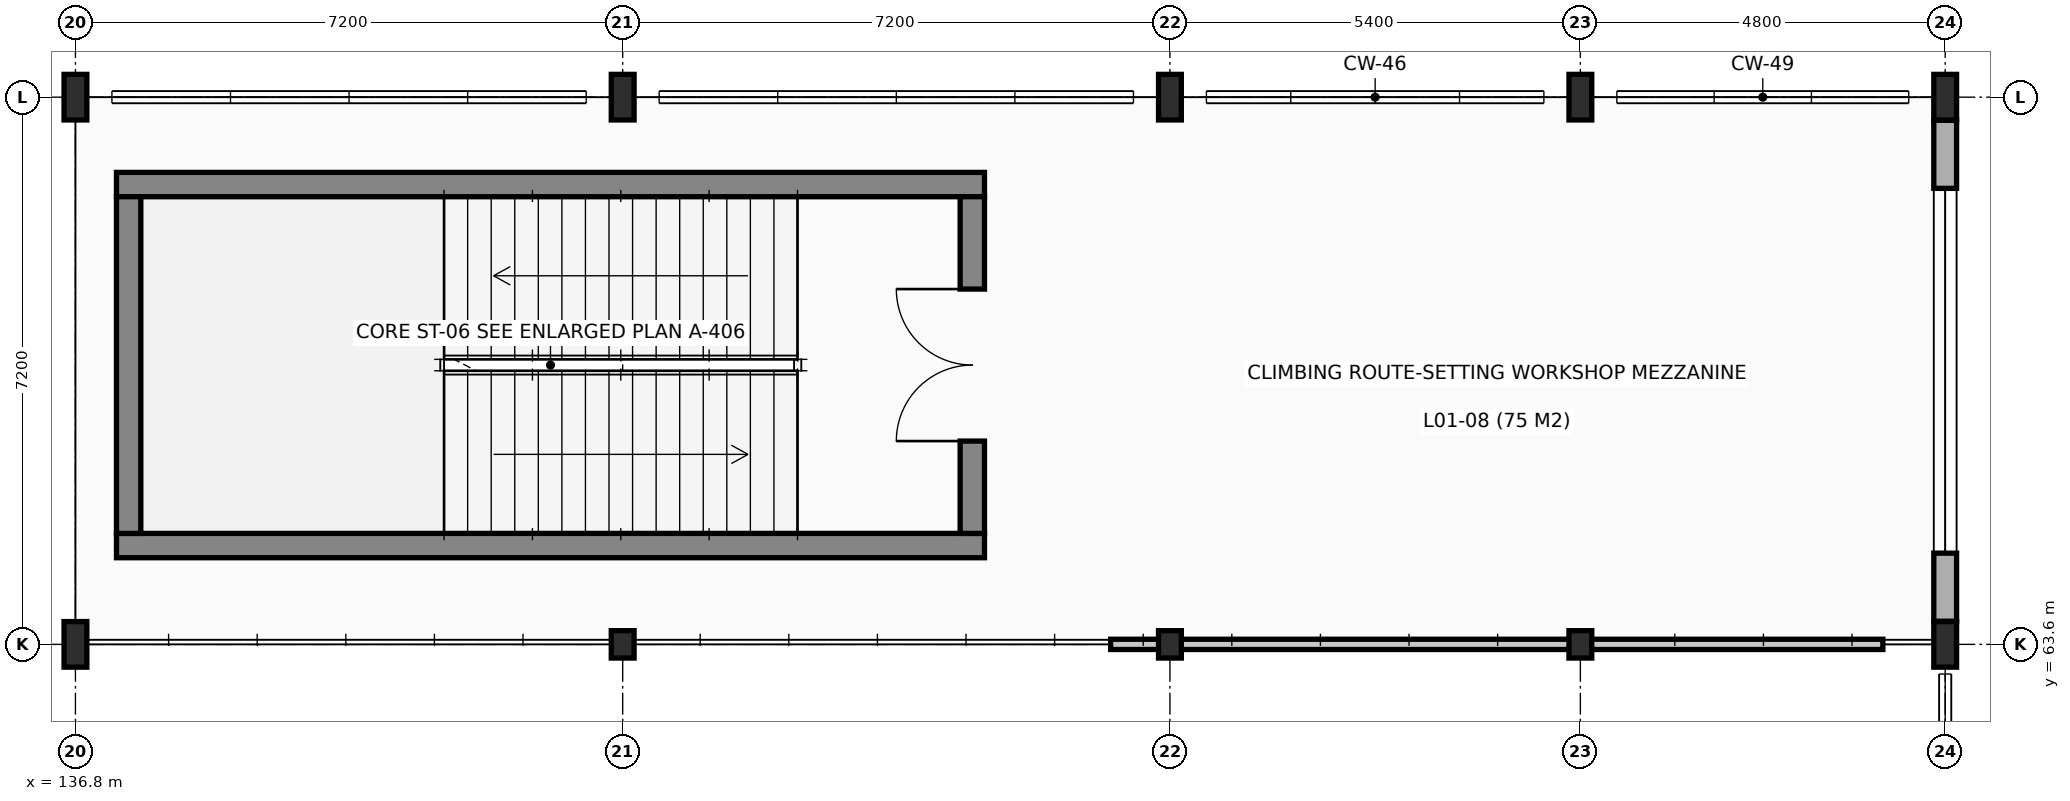
"""IFC4 building model, lengths in metres.
Left out: names, types, materials, properties, quantities, classifications, styles, units other than length and angle.
Written with IfcOpenShell. Run it as: python <this file> out.ifc"""

import sys

from ifc_helpers import new_model, si_unit, direction, frame, frame_2d, origin, origin_2d, place, context, subcontext, project, spatial, rectangle, i_section, extrude, element, fill, save


model = new_model("IFC4")
c1 = context("Model", 3, precision=1e-05, world=origin(), true_north=direction((0.0, 1.0)))
c2 = subcontext(c1, "Body", "Model", "MODEL_VIEW")
j1 = project(units=[si_unit("LENGTHUNIT", "METRE"), si_unit("PLANEANGLEUNIT", "RADIAN")], contexts=[c1])
p1 = place(None, origin())
s1 = spatial("IfcSite", under=j1, at=p1, CompositionType="ELEMENT")
p2 = place(p1, origin())
s2 = spatial("IfcBuilding", under=s1, at=p2, CompositionType="ELEMENT")
p3 = place(p2, frame((0.0, 0.0, 4.8)))
s3 = spatial("IfcBuildingStorey", under=s2, at=p3, CompositionType="ELEMENT", Elevation=4.8)
for number, where, z_axis, x_axis in (
    (1, (136.8, 63.6, 0.0), (0.0, 0.0, 1.0), (1.0, 0.0, 0.0)),
    (2, (136.8, 70.8, 0.0), (0.0, 0.0, 1.0), (1.0, 0.0, 0.0)),
):
    element("IfcColumn", number, at=place(p3, frame(where, z_axis=z_axis, x_axis=x_axis)), inside=s3, PredefinedType="COLUMN", context=c2, shape_type="SweptSolid", body=[
        extrude(i_section(OverallWidth=0.3, OverallDepth=0.6, WebThickness=0.015, FlangeThickness=0.03, at=origin_2d()), origin(), (0.0, 0.0, 1.0), 4.8),
    ])
p4 = place(p3, frame((144.0, 63.6, 0.0), z_axis=(0.0, 0.0, 1.0), x_axis=(1.0, 0.0, 0.0)))
e3 = element("IfcColumn", 3, at=p4, inside=s3, PredefinedType="COLUMN", context=c2, shape_type="SweptSolid", body=[
    extrude(i_section(OverallWidth=0.3, OverallDepth=0.36, WebThickness=0.012, FlangeThickness=0.022, at=origin_2d()), origin(), (0.0, 0.0, 1.0), 4.8),
])
p5 = place(p3, frame((144.0, 70.8, 0.0), z_axis=(0.0, 0.0, 1.0), x_axis=(1.0, 0.0, 0.0)))
e4 = element("IfcColumn", 4, at=p5, inside=s3, PredefinedType="COLUMN", context=c2, shape_type="SweptSolid", body=[
    extrude(i_section(OverallWidth=0.3, OverallDepth=0.6, WebThickness=0.015, FlangeThickness=0.03, at=origin_2d()), origin(), (0.0, 0.0, 1.0), 4.8),
])
p6 = place(p3, frame((151.2, 63.6, 0.0), z_axis=(0.0, 0.0, 1.0), x_axis=(1.0, 0.0, 0.0)))
e5 = element("IfcColumn", 5, at=p6, inside=s3, PredefinedType="COLUMN", context=c2, shape_type="SweptSolid", body=[
    extrude(i_section(OverallWidth=0.3, OverallDepth=0.36, WebThickness=0.012, FlangeThickness=0.022, at=origin_2d()), origin(), (0.0, 0.0, 1.0), 4.8),
])
p7 = place(p3, frame((151.2, 70.8, 0.0), z_axis=(0.0, 0.0, 1.0), x_axis=(1.0, 0.0, 0.0)))
e6 = element("IfcColumn", 6, at=p7, inside=s3, PredefinedType="COLUMN", context=c2, shape_type="SweptSolid", body=[
    extrude(i_section(OverallWidth=0.3, OverallDepth=0.6, WebThickness=0.015, FlangeThickness=0.03, at=origin_2d()), origin(), (0.0, 0.0, 1.0), 4.8),
])
p8 = place(p3, frame((156.6, 63.6, 0.0), z_axis=(0.0, 0.0, 1.0), x_axis=(1.0, 0.0, 0.0)))
e7 = element("IfcColumn", 7, at=p8, inside=s3, PredefinedType="COLUMN", context=c2, shape_type="SweptSolid", body=[
    extrude(i_section(OverallWidth=0.3, OverallDepth=0.36, WebThickness=0.012, FlangeThickness=0.022, at=origin_2d()), origin(), (0.0, 0.0, 1.0), 4.8),
])
for number, where, z_axis, x_axis in (
    (8, (156.6, 70.8, 0.0), (0.0, 0.0, 1.0), (1.0, 0.0, 0.0)),
    (9, (161.4, 63.6, 0.0), (0.0, 0.0, 1.0), (1.0, 0.0, 0.0)),
    (10, (161.4, 70.8, 0.0), (0.0, 0.0, 1.0), (1.0, 0.0, 0.0)),
):
    element("IfcColumn", number, at=place(p3, frame(where, z_axis=z_axis, x_axis=x_axis)), inside=s3, PredefinedType="COLUMN", context=c2, shape_type="SweptSolid", body=[
        extrude(i_section(OverallWidth=0.3, OverallDepth=0.6, WebThickness=0.015, FlangeThickness=0.03, at=origin_2d()), origin(), (0.0, 0.0, 1.0), 4.8),
    ])
p9 = place(p3, frame((161.4, 63.904, 0.0), z_axis=(0.0, 0.0, 1.0), x_axis=(0.0, 1.0, 0.0)))
e11 = element("IfcWall", 11, at=p9, inside=s3, PredefinedType="SOLIDWALL", context=c2, shape_type="SweptSolid", body=[
    extrude(rectangle(XDim=6.592, YDim=0.3, at=frame_2d((3.296, 0.0))), origin(), (0.0, 0.0, 1.0), 4.145),
])
p10 = place(p9, frame((0.896, 0.0, 1.0)))
e12 = element("IfcOpeningElement", 12, at=p10, cuts=e11, PredefinedType="OPENING", context=c2, shape_type="SweptSolid", body=[
    extrude(rectangle(XDim=4.8, YDim=1.5, at=frame_2d((2.4, 0.75))), frame((0.0, 0.16, 0.0), z_axis=(0.0, -1.0, 0.0), x_axis=(1.0, 0.0, 0.0)), (0.0, 0.0, 1.0), 0.32),
])
for number, where, z_axis, x_axis in (
    (13, (137.34, 64.9, 0.0), (0.0, 0.0, 1.0), (1.0, 0.0, 0.0)),
    (14, (137.34, 69.65, 0.0), (0.0, 0.0, 1.0), (1.0, 0.0, 0.0)),
):
    element("IfcWall", number, at=place(p3, frame(where, z_axis=z_axis, x_axis=x_axis)), inside=s3, PredefinedType="SHEAR", context=c2, shape_type="SweptSolid", body=[
        extrude(rectangle(XDim=11.42, YDim=0.32, at=frame_2d((5.71, 0.0))), origin(), (0.0, 0.0, 1.0), 4.56),
    ])
p11 = place(p3, frame((137.5, 65.06, 0.0), z_axis=(0.0, 0.0, 1.0), x_axis=(0.0, 1.0, 0.0)))
e15 = element("IfcWall", 15, at=p11, inside=s3, PredefinedType="SHEAR", context=c2, shape_type="SweptSolid", body=[
    extrude(rectangle(XDim=4.43, YDim=0.32, at=frame_2d((2.215, 0.0))), origin(), (0.0, 0.0, 1.0), 4.56),
])
p12 = place(p3, frame((148.6, 65.06, 0.0), z_axis=(0.0, 0.0, 1.0), x_axis=(0.0, 1.0, 0.0)))
e16 = element("IfcWall", 16, at=p12, inside=s3, PredefinedType="SHEAR", context=c2, shape_type="SweptSolid", body=[
    extrude(rectangle(XDim=4.43, YDim=0.32, at=frame_2d((2.215, 0.0))), origin(), (0.0, 0.0, 1.0), 4.56),
])
p13 = place(p12, frame((1.215, 0.0, 0.0)))
e17 = element("IfcOpeningElement", 17, at=p13, cuts=e16, PredefinedType="OPENING", context=c2, shape_type="SweptSolid", body=[
    extrude(rectangle(XDim=2.0, YDim=2.15, at=frame_2d((1.0, 1.075))), frame((0.0, 0.17, 0.0), z_axis=(0.0, -1.0, 0.0), x_axis=(1.0, 0.0, 0.0)), (0.0, 0.0, 1.0), 0.34),
])
p14 = place(p3, frame((150.42, 63.6, 0.0), z_axis=(0.0, 0.0, 1.0), x_axis=(1.0, 0.0, 0.0)))
e18 = element("IfcWall", 18, at=p14, inside=s3, PredefinedType="PARTITIONING", context=c2, shape_type="SweptSolid", body=[
    extrude(rectangle(XDim=10.16, YDim=0.135, at=frame_2d((5.08, 0.0))), origin(), (0.0, 0.0, 1.0), 4.14),
])
p15 = place(p10, origin())
e19 = element("IfcWindow", 19, at=p15, inside=s3, PartitioningType="SINGLE_PANEL", PredefinedType="WINDOW", context=c2, shape_type="SweptSolid", body=[
    extrude(rectangle(XDim=4.8, YDim=1.5, at=frame_2d((2.4, 0.75))), frame((0.0, 0.03, 0.0), z_axis=(0.0, -1.0, 0.0), x_axis=(1.0, 0.0, 0.0)), (0.0, 0.0, 1.0), 0.06),
])
fill(e12, e19)
p16 = place(p13, origin())
e20 = element("IfcDoor", 20, at=p16, inside=s3, OperationType="DOUBLE_DOOR_SINGLE_SWING", PredefinedType="DOOR", context=c2, shape_type="SweptSolid", body=[
    extrude(rectangle(XDim=2.0, YDim=2.15, at=frame_2d((1.0, 1.075))), frame((0.0, 0.025, 0.0), z_axis=(0.0, -1.0, 0.0), x_axis=(1.0, 0.0, 0.0)), (0.0, 0.0, 1.0), 0.05),
])
fill(e17, e20)
save(model, sys.argv[1])
